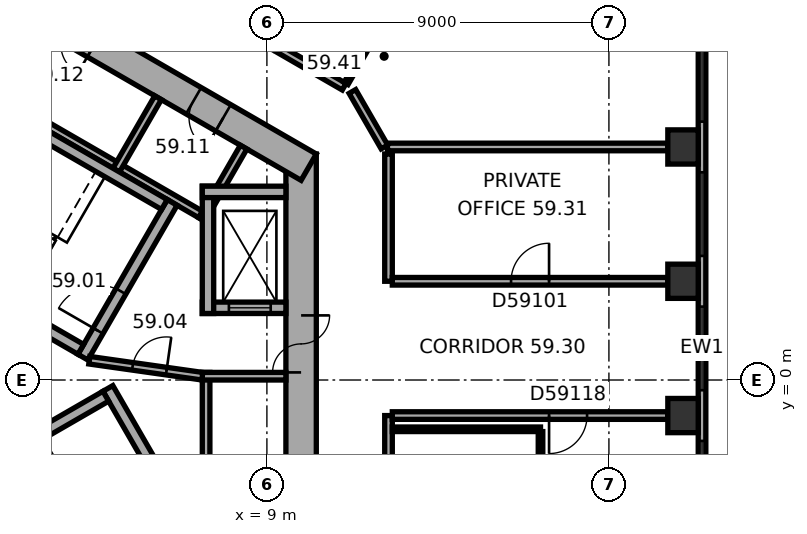
"""IFC4 building model, lengths in metres.
Left out: names, types, materials, properties, quantities, classifications, styles, units other than length and angle.
Written with IfcOpenShell. Run it as: python <this file> out.ifc"""

import sys

from ifc_helpers import new_model, si_unit, direction, frame, frame_2d, origin, origin_2d, place, context, subcontext, project, spatial, rectangle, extrude, element, fill, save


model = new_model("IFC4")
c1 = context("Model", 3, precision=1e-05, world=origin(), true_north=direction((0.0, 1.0)))
c2 = subcontext(c1, "Body", "Model", "MODEL_VIEW")
j1 = project(units=[si_unit("LENGTHUNIT", "METRE"), si_unit("PLANEANGLEUNIT", "RADIAN")], contexts=[c1])
p1 = place(None, origin())
s1 = spatial("IfcSite", under=j1, at=p1, CompositionType="ELEMENT")
p2 = place(p1, origin())
s2 = spatial("IfcBuilding", under=s1, at=p2, CompositionType="ELEMENT")
p3 = place(p2, frame((0.0, 0.0, 240.2)))
s3 = spatial("IfcBuildingStorey", under=s2, at=p3, CompositionType="ELEMENT", Elevation=240.2)
for number, where, z_axis, x_axis in (
    (1, (19.95, -0.936, 0.0), (0.0, 0.0, 1.0), (0.0, 1.0, 0.0)),
    (2, (19.95, 2.598, 0.0), (0.0, 0.0, 1.0), (0.0, 1.0, 0.0)),
    (3, (19.95, 6.132, 0.0), (0.0, 0.0, 1.0), (0.0, 1.0, 0.0)),
):
    element("IfcColumn", number, at=place(p3, frame(where, z_axis=z_axis, x_axis=x_axis)), inside=s3, PredefinedType="COLUMN", context=c2, shape_type="SweptSolid", body=[
        extrude(rectangle(XDim=0.9, YDim=0.8, at=origin_2d()), origin(), (0.0, 0.0, 1.0), 3.7),
    ])
p4 = place(p3, frame((9.9, -5.947, 0.0), z_axis=(0.0, 0.0, 1.0), x_axis=(0.0, 1.0, 0.0)))
e4 = element("IfcWall", 4, at=p4, inside=s3, PredefinedType="SHEAR", context=c2, shape_type="SweptSolid", body=[
    extrude(rectangle(XDim=11.894, YDim=0.8, at=frame_2d((5.947, 0.0))), origin(), (0.0, 0.0, 1.0), 3.7),
])
p5 = place(p4, frame((6.147, 0.0, 0.0)))
e5 = element("IfcOpeningElement", 5, at=p5, cuts=e4, PredefinedType="OPENING", context=c2, shape_type="SweptSolid", body=[
    extrude(rectangle(XDim=1.5, YDim=2.1, at=frame_2d((0.75, 1.05))), frame((0.0, 0.41, 0.0), z_axis=(0.0, -1.0, 0.0), x_axis=(1.0, 0.0, 0.0)), (0.0, 0.0, 1.0), 0.82),
])
p6 = place(p4, frame((2.997, 0.0, 0.0)))
e6 = element("IfcOpeningElement", 6, at=p6, cuts=e4, PredefinedType="OPENING", context=c2, shape_type="SweptSolid", body=[
    extrude(rectangle(XDim=0.9, YDim=2.1, at=frame_2d((0.45, 1.05))), frame((0.0, 0.41, 0.0), z_axis=(0.0, -1.0, 0.0), x_axis=(1.0, 0.0, 0.0)), (0.0, 0.0, 1.0), 0.82),
])
p7 = place(p3, frame((10.1, 5.6, 0.0), z_axis=(0.0, 0.0, 1.0), x_axis=(-0.866023897231, 0.500002609418, 0.0)))
e7 = element("IfcWall", 7, at=p7, inside=s3, PredefinedType="SHEAR", context=c2, shape_type="SweptSolid", body=[
    extrude(rectangle(XDim=11.894, YDim=0.8, at=frame_2d((5.947, 0.0))), origin(), (0.0, 0.0, 1.0), 3.7),
])
p8 = place(p7, frame((2.597, 0.0, 0.0)))
e8 = element("IfcOpeningElement", 8, at=p8, cuts=e7, PredefinedType="OPENING", context=c2, shape_type="SweptSolid", body=[
    extrude(rectangle(XDim=0.9, YDim=2.1, at=frame_2d((0.45, 1.05))), frame((0.0, 0.41, 0.0), z_axis=(0.0, -1.0, 0.0), x_axis=(1.0, 0.0, 0.0)), (0.0, 0.0, 1.0), 0.82),
])
p9 = place(p7, frame((6.497, 0.0, 0.0)))
e9 = element("IfcOpeningElement", 9, at=p9, cuts=e7, PredefinedType="OPENING", context=c2, shape_type="SweptSolid", body=[
    extrude(rectangle(XDim=0.9, YDim=2.1, at=frame_2d((0.45, 1.05))), frame((0.0, 0.41, 0.0), z_axis=(0.0, -1.0, 0.0), x_axis=(1.0, 0.0, 0.0)), (0.0, 0.0, 1.0), 0.82),
])
p10 = place(p3, frame((20.45, -8.59, 0.0), z_axis=(0.0, 0.0, 1.0), x_axis=(0.0, 1.0, 0.0)))
e10 = element("IfcWall", 10, at=p10, inside=s3, PredefinedType="STANDARD", context=c2, shape_type="SweptSolid", body=[
    extrude(rectangle(XDim=18.841, YDim=0.2, at=frame_2d((9.421, 0.0))), origin(), (0.0, 0.0, 1.0), 3.7),
])
p11 = place(p10, frame((1.254, 0.0, 0.9)))
e11 = element("IfcOpeningElement", 11, at=p11, cuts=e10, PredefinedType="OPENING", context=c2, shape_type="SweptSolid", body=[
    extrude(rectangle(XDim=2.2, YDim=2.0, at=frame_2d((1.1, 1.0))), frame((0.0, 0.11, 0.0), z_axis=(0.0, -1.0, 0.0), x_axis=(1.0, 0.0, 0.0)), (0.0, 0.0, 1.0), 0.22),
])
p12 = place(p10, frame((4.788, 0.0, 0.9)))
e12 = element("IfcOpeningElement", 12, at=p12, cuts=e10, PredefinedType="OPENING", context=c2, shape_type="SweptSolid", body=[
    extrude(rectangle(XDim=2.2, YDim=2.0, at=frame_2d((1.1, 1.0))), frame((0.0, 0.11, 0.0), z_axis=(0.0, -1.0, 0.0), x_axis=(1.0, 0.0, 0.0)), (0.0, 0.0, 1.0), 0.22),
])
p13 = place(p10, frame((8.322, 0.0, 0.9)))
e13 = element("IfcOpeningElement", 13, at=p13, cuts=e10, PredefinedType="OPENING", context=c2, shape_type="SweptSolid", body=[
    extrude(rectangle(XDim=2.2, YDim=2.0, at=frame_2d((1.1, 1.0))), frame((0.0, 0.11, 0.0), z_axis=(0.0, -1.0, 0.0), x_axis=(1.0, 0.0, 0.0)), (0.0, 0.0, 1.0), 0.22),
])
p14 = place(p10, frame((11.855, 0.0, 0.9)))
e14 = element("IfcOpeningElement", 14, at=p14, cuts=e10, PredefinedType="OPENING", context=c2, shape_type="SweptSolid", body=[
    extrude(rectangle(XDim=2.2, YDim=2.0, at=frame_2d((1.1, 1.0))), frame((0.0, 0.11, 0.0), z_axis=(0.0, -1.0, 0.0), x_axis=(1.0, 0.0, 0.0)), (0.0, 0.0, 1.0), 0.22),
])
p15 = place(p10, frame((15.389, 0.0, 0.9)))
e15 = element("IfcOpeningElement", 15, at=p15, cuts=e10, PredefinedType="OPENING", context=c2, shape_type="SweptSolid", body=[
    extrude(rectangle(XDim=2.2, YDim=2.0, at=frame_2d((1.1, 1.0))), frame((0.0, 0.11, 0.0), z_axis=(0.0, -1.0, 0.0), x_axis=(1.0, 0.0, 0.0)), (0.0, 0.0, 1.0), 0.22),
])
p16 = place(p3, frame((7.4, -5.2, 0.0), z_axis=(0.0, 0.0, 1.0), x_axis=(0.0, 1.0, 0.0)))
e16 = element("IfcWall", 16, at=p16, inside=s3, PredefinedType="PARTITIONING", context=c2, shape_type="SweptSolid", body=[
    extrude(rectangle(XDim=5.4, YDim=0.2, at=frame_2d((2.7, 0.0))), origin(), (0.0, 0.0, 1.0), 3.42),
])
p17 = place(p3, frame((7.3, 0.1, 0.0), z_axis=(0.0, 0.0, 1.0), x_axis=(1.0, 0.0, 0.0)))
e17 = element("IfcWall", 17, at=p17, inside=s3, PredefinedType="PARTITIONING", context=c2, shape_type="SweptSolid", body=[
    extrude(rectangle(XDim=2.2, YDim=0.2, at=frame_2d((1.1, 0.0))), origin(), (0.0, 0.0, 1.0), 3.42),
])
p18 = place(p3, frame((7.424, 4.259, 0.0), z_axis=(0.0, 0.0, 1.0), x_axis=(-0.866026010844, 0.49999894854, 0.0)))
e18 = element("IfcWall", 18, at=p18, inside=s3, PredefinedType="PARTITIONING", context=c2, shape_type="SweptSolid", body=[
    extrude(rectangle(XDim=8.0, YDim=0.2, at=frame_2d((4.0, 0.0))), origin(), (0.0, 0.0, 1.0), 3.42),
])
for number, where, z_axis, x_axis in (
    (19, (7.287, 4.222, 0.0), (0.0, 0.0, 1.0), (0.5, 0.866, 0.0)),
    (20, (5.036, 5.522, 0.0), (0.0, 0.0, 1.0), (0.5, 0.866, 0.0)),
):
    element("IfcWall", number, at=place(p3, frame(where, z_axis=z_axis, x_axis=x_axis)), inside=s3, PredefinedType="PARTITIONING", context=c2, shape_type="SweptSolid", body=[
        extrude(rectangle(XDim=2.2, YDim=0.2, at=frame_2d((1.1, 0.0))), origin(), (0.0, 0.0, 1.0), 3.42),
    ])
p19 = place(p3, frame((4.158, 0.602, 0.0), z_axis=(0.0, 0.0, 1.0), x_axis=(0.499977259774, 0.866038532462, 0.0)))
e21 = element("IfcWall", 21, at=p19, inside=s3, PredefinedType="SHEAR", context=c2, shape_type="SweptSolid", body=[
    extrude(rectangle(XDim=4.7, YDim=0.3, at=frame_2d((2.35, 0.0))), origin(), (0.0, 0.0, 1.0), 3.42),
])
p20 = place(p19, frame((0.8, 0.0, 0.0)))
e22 = element("IfcOpeningElement", 22, at=p20, cuts=e21, PredefinedType="OPENING", context=c2, shape_type="SweptSolid", body=[
    extrude(rectangle(XDim=1.2, YDim=2.1, at=frame_2d((0.6, 1.05))), frame((0.0, 0.16, 0.0), z_axis=(0.0, -1.0, 0.0), x_axis=(1.0, 0.0, 0.0)), (0.0, 0.0, 1.0), 0.32),
])
for number, where, z_axis, x_axis in (
    (23, (4.103, 0.807, 0.0), (0.0, 0.0, 1.0), (-0.866, 0.5, 0.0)),
    (24, (6.303, 4.617, 0.0), (0.0, 0.0, 1.0), (-0.866, 0.5, 0.0)),
):
    element("IfcWall", number, at=place(p3, frame(where, z_axis=z_axis, x_axis=x_axis)), inside=s3, PredefinedType="SHEAR", context=c2, shape_type="SweptSolid", body=[
        extrude(rectangle(XDim=7.06, YDim=0.3, at=frame_2d((3.53, 0.0))), origin(), (0.0, 0.0, 1.0), 3.42),
    ])
p21 = place(p3, frame((4.816, -0.222, 0.0), z_axis=(0.0, 0.0, 1.0), x_axis=(0.499977259774, -0.866038532462, 0.0)))
e25 = element("IfcWall", 25, at=p21, inside=s3, PredefinedType="SHEAR", context=c2, shape_type="SweptSolid", body=[
    extrude(rectangle(XDim=4.7, YDim=0.3, at=frame_2d((2.35, 0.0))), origin(), (0.0, 0.0, 1.0), 3.42),
])
p22 = place(p3, frame((-1.353, -3.957, 0.0), z_axis=(0.0, 0.0, 1.0), x_axis=(0.866027801685, 0.499995846692, 0.0)))
e26 = element("IfcWall", 26, at=p22, inside=s3, PredefinedType="SHEAR", context=c2, shape_type="SweptSolid", body=[
    extrude(rectangle(XDim=7.06, YDim=0.3, at=frame_2d((3.53, 0.0))), origin(), (0.0, 0.0, 1.0), 3.42),
])
p23 = place(p3, frame((7.3, 1.9, 0.0), z_axis=(0.0, 0.0, 1.0), x_axis=(1.0, 0.0, 0.0)))
e27 = element("IfcWall", 27, at=p23, inside=s3, PredefinedType="SHEAR", context=c2, shape_type="SweptSolid", body=[
    extrude(rectangle(XDim=2.2, YDim=0.3, at=frame_2d((1.1, 0.0))), origin(), (0.0, 0.0, 1.0), 3.42),
])
p24 = place(p23, frame((0.7, 0.0, 0.0)))
e28 = element("IfcOpeningElement", 28, at=p24, cuts=e27, PredefinedType="OPENING", context=c2, shape_type="SweptSolid", body=[
    extrude(rectangle(XDim=1.1, YDim=2.1, at=frame_2d((0.55, 1.05))), frame((0.0, 0.16, 0.0), z_axis=(0.0, -1.0, 0.0), x_axis=(1.0, 0.0, 0.0)), (0.0, 0.0, 1.0), 0.32),
])
p25 = place(p3, frame((7.45, 1.75, 0.0), z_axis=(0.0, 0.0, 1.0), x_axis=(0.0, 1.0, 0.0)))
e29 = element("IfcWall", 29, at=p25, inside=s3, PredefinedType="SHEAR", context=c2, shape_type="SweptSolid", body=[
    extrude(rectangle(XDim=3.35, YDim=0.3, at=frame_2d((1.675, 0.0))), origin(), (0.0, 0.0, 1.0), 3.42),
])
p26 = place(p3, frame((7.3, 4.95, 0.0), z_axis=(0.0, 0.0, 1.0), x_axis=(1.0, 0.0, 0.0)))
e30 = element("IfcWall", 30, at=p26, inside=s3, PredefinedType="SHEAR", context=c2, shape_type="SweptSolid", body=[
    extrude(rectangle(XDim=2.2, YDim=0.3, at=frame_2d((1.1, 0.0))), origin(), (0.0, 0.0, 1.0), 3.42),
])
p27 = place(p3, frame((4.327, 0.521, 0.0), z_axis=(0.0, 0.0, 1.0), x_axis=(0.990124376366, -0.14019172346, 0.0)))
e31 = element("IfcWall", 31, at=p27, inside=s3, PredefinedType="PARTITIONING", context=c2, shape_type="SweptSolid", body=[
    extrude(rectangle(XDim=3.002, YDim=0.2, at=frame_2d((1.501, 0.0))), origin(), (0.0, 0.0, 1.0), 3.42),
])
p28 = place(p27, frame((1.15, 0.0, 0.0)))
e32 = element("IfcOpeningElement", 32, at=p28, cuts=e31, PredefinedType="OPENING", context=c2, shape_type="SweptSolid", body=[
    extrude(rectangle(XDim=0.9, YDim=2.1, at=frame_2d((0.45, 1.05))), frame((0.0, 0.11, 0.0), z_axis=(0.0, -1.0, 0.0), x_axis=(1.0, 0.0, 0.0)), (0.0, 0.0, 1.0), 0.22),
])
p29 = place(p3, frame((11.033, 7.717, 0.0), z_axis=(0.0, 0.0, 1.0), x_axis=(-0.866010750942, 0.50002537861, 0.0)))
e33 = element("IfcWall", 33, at=p29, inside=s3, PredefinedType="PARTITIONING", context=c2, shape_type="SweptSolid", body=[
    extrude(rectangle(XDim=2.0, YDim=0.2, at=frame_2d((1.0, 0.0))), origin(), (0.0, 0.0, 1.0), 3.42),
])
p30 = place(p3, frame((12.093, 6.132, 0.0), z_axis=(0.0, 0.0, 1.0), x_axis=(-0.500031561776, 0.866007180818, 0.0)))
e34 = element("IfcWall", 34, at=p30, inside=s3, PredefinedType="PARTITIONING", context=c2, shape_type="SweptSolid", body=[
    extrude(rectangle(XDim=1.687, YDim=0.2, at=frame_2d((0.843, 0.0))), origin(), (0.0, 0.0, 1.0), 3.42),
])
p31 = place(p3, frame((12.2, -5.697, 0.0), z_axis=(0.0, 0.0, 1.0), x_axis=(0.0, 1.0, 0.0)))
e35 = element("IfcWall", 35, at=p31, inside=s3, PredefinedType="PARTITIONING", context=c2, shape_type="SweptSolid", body=[
    extrude(rectangle(XDim=4.761, YDim=0.2, at=frame_2d((2.381, 0.0))), origin(), (0.0, 0.0, 1.0), 3.42),
])
p32 = place(p3, frame((12.2, 2.598, 0.0), z_axis=(0.0, 0.0, 1.0), x_axis=(0.0, 1.0, 0.0)))
e36 = element("IfcWall", 36, at=p32, inside=s3, PredefinedType="PARTITIONING", context=c2, shape_type="SweptSolid", body=[
    extrude(rectangle(XDim=3.349, YDim=0.2, at=frame_2d((1.674, 0.0))), origin(), (0.0, 0.0, 1.0), 3.42),
])
p33 = place(p3, frame((12.204, 9.744, 0.0), z_axis=(0.0, 0.0, 1.0), x_axis=(-0.500030632641, -0.866007717299, 0.0)))
e37 = element("IfcWall", 37, at=p33, inside=s3, PredefinedType="PARTITIONING", context=c2, shape_type="SweptSolid", body=[
    extrude(rectangle(XDim=2.24, YDim=0.12, at=frame_2d((1.12, 0.0))), origin(), (0.0, 0.0, 1.0), 3.42),
])
p34 = place(p33, frame((0.67, 0.0, 0.0)))
e38 = element("IfcOpeningElement", 38, at=p34, cuts=e37, PredefinedType="OPENING", context=c2, shape_type="SweptSolid", body=[
    extrude(rectangle(XDim=0.9, YDim=2.1, at=frame_2d((0.45, 1.05))), frame((0.0, 0.07, 0.0), z_axis=(0.0, -1.0, 0.0), x_axis=(1.0, 0.0, 0.0)), (0.0, 0.0, 1.0), 0.14),
])
p35 = place(p3, frame((12.3, -1.297, 0.0), z_axis=(0.0, 0.0, 1.0), x_axis=(1.0, 0.0, 0.0)))
e39 = element("IfcWall", 39, at=p35, inside=s3, PredefinedType="PARTITIONING", context=c2, shape_type="SweptSolid", body=[
    extrude(rectangle(XDim=3.9, YDim=0.12, at=frame_2d((1.95, 0.0))), origin(), (0.0, 0.0, 1.0), 3.42),
])
p36 = place(p3, frame((12.3, -0.936, 0.0), z_axis=(0.0, 0.0, 1.0), x_axis=(1.0, 0.0, 0.0)))
e40 = element("IfcWall", 40, at=p36, inside=s3, PredefinedType="PARTITIONING", context=c2, shape_type="SweptSolid", body=[
    extrude(rectangle(XDim=7.25, YDim=0.2, at=frame_2d((3.625, 0.0))), origin(), (0.0, 0.0, 1.0), 2.87),
])
p37 = place(p36, frame((4.125, 0.0, 0.0)))
e41 = element("IfcOpeningElement", 41, at=p37, cuts=e40, PredefinedType="OPENING", context=c2, shape_type="SweptSolid", body=[
    extrude(rectangle(XDim=1.0, YDim=2.1, at=frame_2d((0.5, 1.05))), frame((0.0, 0.11, 0.0), z_axis=(0.0, -1.0, 0.0), x_axis=(1.0, 0.0, 0.0)), (0.0, 0.0, 1.0), 0.22),
])
p38 = place(p3, frame((16.2, -1.357, 0.0), z_axis=(0.0, 0.0, 1.0), x_axis=(0.0, -1.0, 0.0)))
e42 = element("IfcWall", 42, at=p38, inside=s3, PredefinedType="PARTITIONING", context=c2, shape_type="SweptSolid", body=[
    extrude(rectangle(XDim=4.28, YDim=0.12, at=frame_2d((2.14, 0.0))), origin(), (0.0, 0.0, 1.0), 3.42),
])
p39 = place(p3, frame((19.55, 2.598, 0.0), z_axis=(0.0, 0.0, 1.0), x_axis=(-1.0, 0.0, 0.0)))
e43 = element("IfcWall", 43, at=p39, inside=s3, PredefinedType="PARTITIONING", context=c2, shape_type="SweptSolid", body=[
    extrude(rectangle(XDim=7.25, YDim=0.2, at=frame_2d((3.625, 0.0))), origin(), (0.0, 0.0, 1.0), 3.42),
])
p40 = place(p39, frame((3.125, 0.0, 0.0)))
e44 = element("IfcOpeningElement", 44, at=p40, cuts=e43, PredefinedType="OPENING", context=c2, shape_type="SweptSolid", body=[
    extrude(rectangle(XDim=1.0, YDim=2.1, at=frame_2d((0.5, 1.05))), frame((0.0, 0.11, 0.0), z_axis=(0.0, -1.0, 0.0), x_axis=(1.0, 0.0, 0.0)), (0.0, 0.0, 1.0), 0.22),
])
p41 = place(p3, frame((19.55, 6.132, 0.0), z_axis=(0.0, 0.0, 1.0), x_axis=(-1.0, 0.0, 0.0)))
e45 = element("IfcWall", 45, at=p41, inside=s3, PredefinedType="PARTITIONING", context=c2, shape_type="SweptSolid", body=[
    extrude(rectangle(XDim=7.377, YDim=0.2, at=frame_2d((3.688, 0.0))), origin(), (0.0, 0.0, 1.0), 3.42),
])
p42 = place(p12, origin())
e46 = element("IfcWindow", 46, at=p42, inside=s3, PartitioningType="SINGLE_PANEL", PredefinedType="WINDOW", context=c2, shape_type="SweptSolid", body=[
    extrude(rectangle(XDim=2.2, YDim=2.0, at=frame_2d((1.1, 1.0))), frame((0.0, 0.03, 0.0), z_axis=(0.0, -1.0, 0.0), x_axis=(1.0, 0.0, 0.0)), (0.0, 0.0, 1.0), 0.06),
])
fill(e12, e46)
p43 = place(p13, origin())
e47 = element("IfcWindow", 47, at=p43, inside=s3, PartitioningType="SINGLE_PANEL", PredefinedType="WINDOW", context=c2, shape_type="SweptSolid", body=[
    extrude(rectangle(XDim=2.2, YDim=2.0, at=frame_2d((1.1, 1.0))), frame((0.0, 0.03, 0.0), z_axis=(0.0, -1.0, 0.0), x_axis=(1.0, 0.0, 0.0)), (0.0, 0.0, 1.0), 0.06),
])
fill(e13, e47)
p44 = place(p14, origin())
e48 = element("IfcWindow", 48, at=p44, inside=s3, PartitioningType="SINGLE_PANEL", PredefinedType="WINDOW", context=c2, shape_type="SweptSolid", body=[
    extrude(rectangle(XDim=2.2, YDim=2.0, at=frame_2d((1.1, 1.0))), frame((0.0, 0.03, 0.0), z_axis=(0.0, -1.0, 0.0), x_axis=(1.0, 0.0, 0.0)), (0.0, 0.0, 1.0), 0.06),
])
fill(e14, e48)
p45 = place(p15, origin())
e49 = element("IfcWindow", 49, at=p45, inside=s3, PartitioningType="SINGLE_PANEL", PredefinedType="WINDOW", context=c2, shape_type="SweptSolid", body=[
    extrude(rectangle(XDim=2.2, YDim=2.0, at=frame_2d((1.1, 1.0))), frame((0.0, 0.03, 0.0), z_axis=(0.0, -1.0, 0.0), x_axis=(1.0, 0.0, 0.0)), (0.0, 0.0, 1.0), 0.06),
])
fill(e15, e49)
p46 = place(p5, origin())
e50 = element("IfcDoor", 50, at=p46, inside=s3, OperationType="DOUBLE_DOOR_SINGLE_SWING", PredefinedType="DOOR", context=c2, shape_type="SweptSolid", body=[
    extrude(rectangle(XDim=1.5, YDim=2.1, at=frame_2d((0.75, 1.05))), frame((0.0, 0.025, 0.0), z_axis=(0.0, -1.0, 0.0), x_axis=(1.0, 0.0, 0.0)), (0.0, 0.0, 1.0), 0.05),
])
fill(e5, e50)
p47 = place(p20, origin())
e51 = element("IfcDoor", 51, at=p47, inside=s3, OperationType="SINGLE_SWING_RIGHT", PredefinedType="DOOR", context=c2, shape_type="SweptSolid", body=[
    extrude(rectangle(XDim=1.2, YDim=2.1, at=frame_2d((0.6, 1.05))), frame((0.0, 0.025, 0.0), z_axis=(0.0, -1.0, 0.0), x_axis=(1.0, 0.0, 0.0)), (0.0, 0.0, 1.0), 0.05),
])
fill(e22, e51)
p48 = place(p28, origin())
e52 = element("IfcDoor", 52, at=p48, inside=s3, OperationType="SINGLE_SWING_LEFT", PredefinedType="DOOR", context=c2, shape_type="SweptSolid", body=[
    extrude(rectangle(XDim=0.9, YDim=2.1, at=frame_2d((0.45, 1.05))), frame((0.0, 0.025, 0.0), z_axis=(0.0, -1.0, 0.0), x_axis=(1.0, 0.0, 0.0)), (0.0, 0.0, 1.0), 0.05),
])
fill(e32, e52)
p49 = place(p8, origin())
e53 = element("IfcDoor", 53, at=p49, inside=s3, OperationType="SINGLE_SWING_LEFT", PredefinedType="DOOR", context=c2, shape_type="SweptSolid", body=[
    extrude(rectangle(XDim=0.9, YDim=2.1, at=frame_2d((0.45, 1.05))), frame((0.0, 0.025, 0.0), z_axis=(0.0, -1.0, 0.0), x_axis=(1.0, 0.0, 0.0)), (0.0, 0.0, 1.0), 0.05),
])
fill(e8, e53)
p50 = place(p24, origin())
e54 = element("IfcDoor", 54, at=p50, inside=s3, OperationType="DOUBLE_DOOR_SLIDING", PredefinedType="DOOR", context=c2, shape_type="SweptSolid", body=[
    extrude(rectangle(XDim=1.1, YDim=2.1, at=frame_2d((0.55, 1.05))), frame((0.0, 0.025, 0.0), z_axis=(0.0, -1.0, 0.0), x_axis=(1.0, 0.0, 0.0)), (0.0, 0.0, 1.0), 0.05),
])
fill(e28, e54)
p51 = place(p40, origin())
e55 = element("IfcDoor", 55, at=p51, inside=s3, OperationType="SINGLE_SWING_LEFT", PredefinedType="DOOR", context=c2, shape_type="SweptSolid", body=[
    extrude(rectangle(XDim=1.0, YDim=2.1, at=frame_2d((0.5, 1.05))), frame((0.0, 0.025, 0.0), z_axis=(0.0, -1.0, 0.0), x_axis=(1.0, 0.0, 0.0)), (0.0, 0.0, 1.0), 0.05),
])
fill(e44, e55)
p52 = place(p34, origin())
e56 = element("IfcDoor", 56, at=p52, inside=s3, OperationType="SINGLE_SWING_LEFT", PredefinedType="DOOR", context=c2, shape_type="SweptSolid", body=[
    extrude(rectangle(XDim=0.9, YDim=2.1, at=frame_2d((0.45, 1.05))), frame((0.0, 0.025, 0.0), z_axis=(0.0, -1.0, 0.0), x_axis=(1.0, 0.0, 0.0)), (0.0, 0.0, 1.0), 0.05),
])
fill(e38, e56)
p53 = place(p37, origin())
e57 = element("IfcDoor", 57, at=p53, inside=s3, OperationType="SINGLE_SWING_LEFT", PredefinedType="DOOR", context=c2, shape_type="SweptSolid", body=[
    extrude(rectangle(XDim=1.0, YDim=2.1, at=frame_2d((0.5, 1.05))), frame((0.0, 0.025, 0.0), z_axis=(0.0, -1.0, 0.0), x_axis=(1.0, 0.0, 0.0)), (0.0, 0.0, 1.0), 0.05),
])
fill(e41, e57)
save(model, sys.argv[1])
